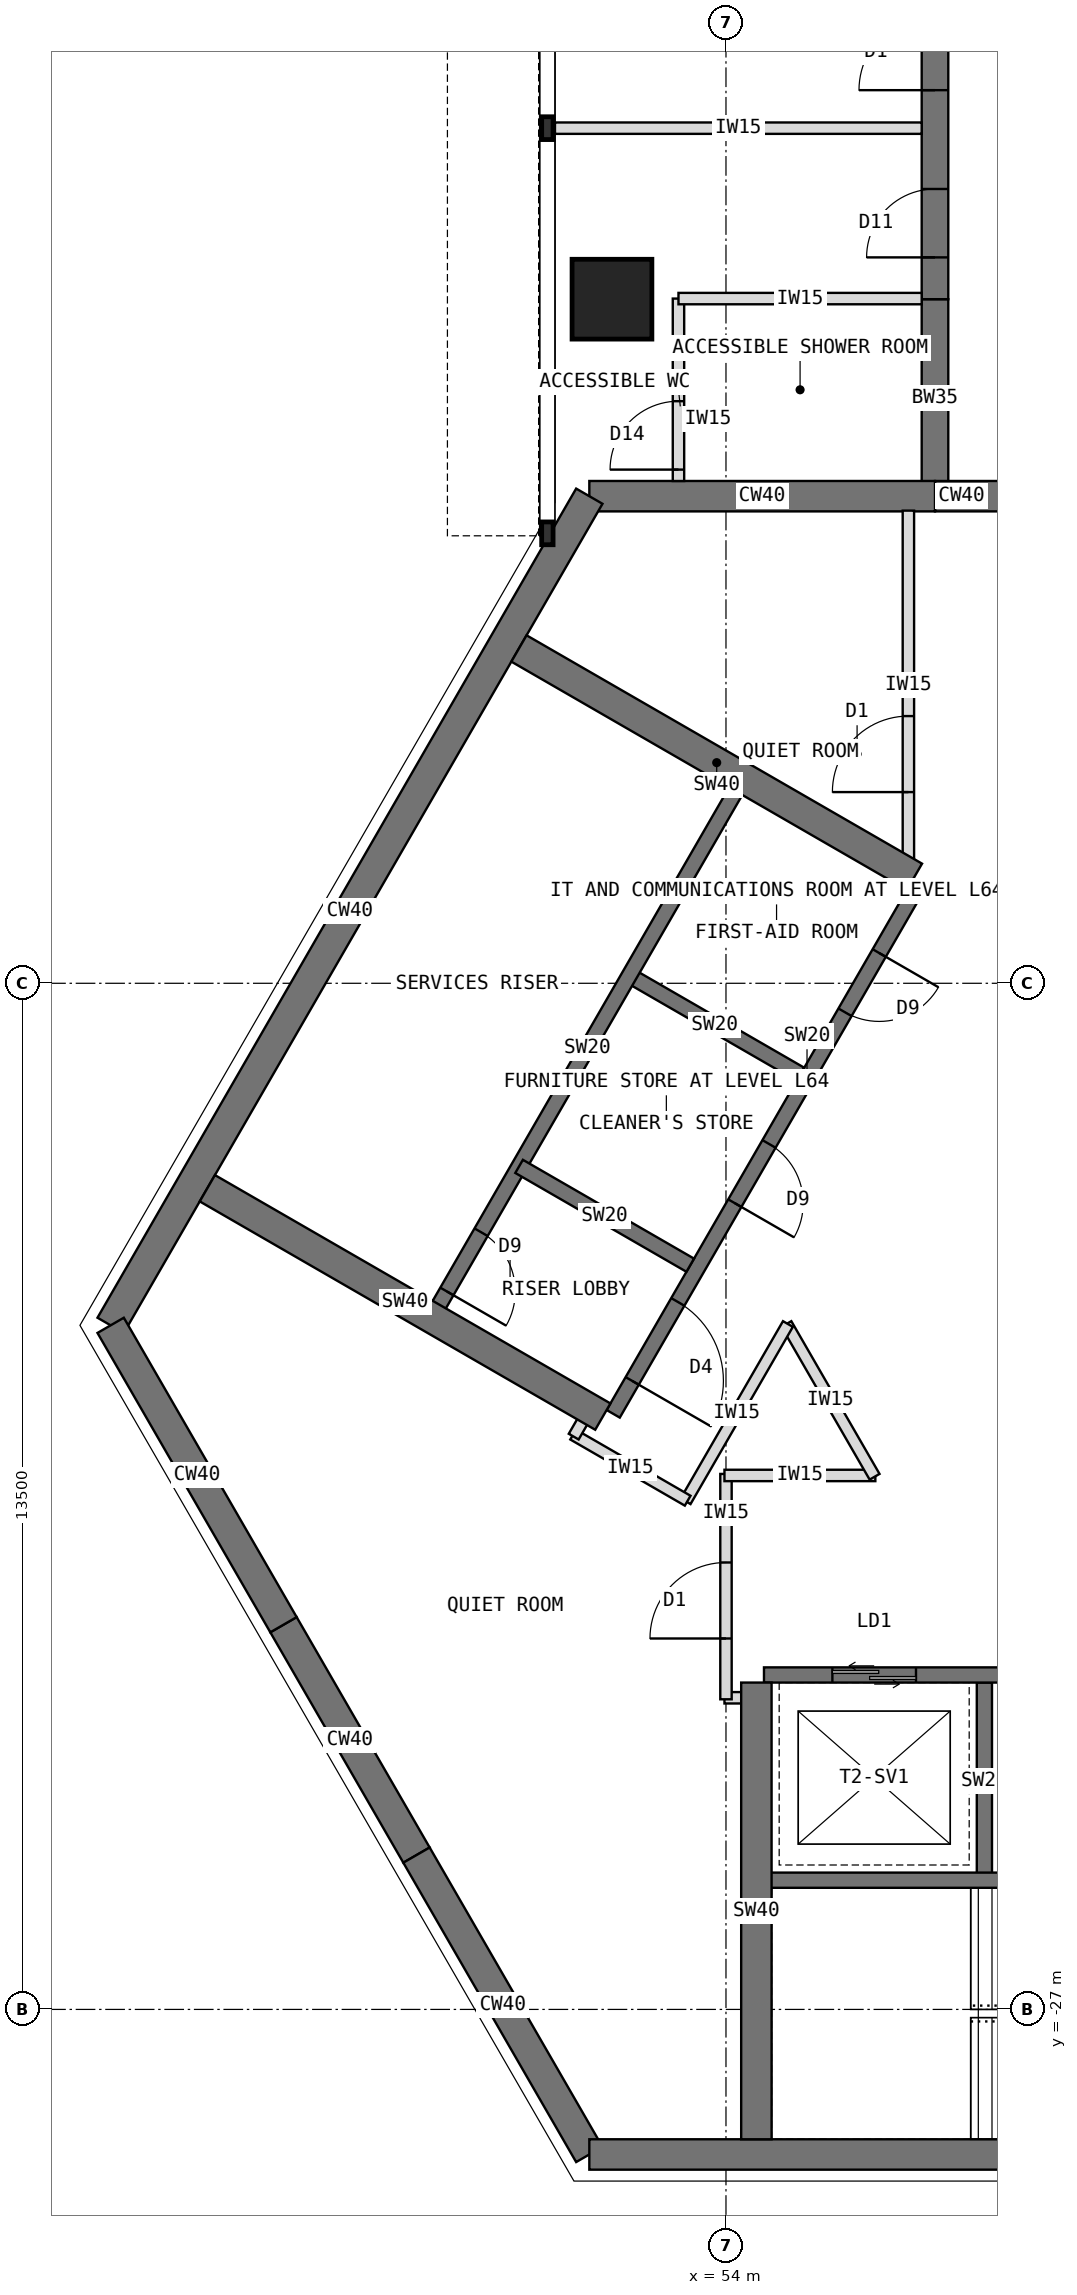
"""IFC4 building model, lengths in metres.
Left out: names, types, materials, properties, quantities, classifications, styles, units other than length and angle.
Written with IfcOpenShell. Run it as: python <this file> out.ifc"""

import sys

from ifc_helpers import new_model, si_unit, direction, frame, frame_2d, origin, origin_2d, place, context, subcontext, project, spatial, rectangle, extrude, element, fill, save


model = new_model("IFC4")
c1 = context("Model", 3, precision=1e-05, world=origin(), true_north=direction((0.0, 1.0)))
c2 = subcontext(c1, "Body", "Model", "MODEL_VIEW")
j1 = project(units=[si_unit("LENGTHUNIT", "METRE"), si_unit("PLANEANGLEUNIT", "RADIAN")], contexts=[c1])
p1 = place(None, origin())
s1 = spatial("IfcSite", under=j1, at=p1, CompositionType="ELEMENT")
p2 = place(p1, origin())
s2 = spatial("IfcBuilding", under=s1, at=p2, CompositionType="ELEMENT")
p3 = place(p2, frame((0.0, 0.0, 259.5)))
s3 = spatial("IfcBuildingStorey", under=s2, at=p3, CompositionType="ELEMENT", Elevation=259.5)
p4 = place(p3, frame((60.25, -7.092, 0.0), z_axis=(0.0, 0.0, 1.0), x_axis=(-1.0, 0.0, 0.0)))
e1 = element("IfcWall", 1, at=p4, inside=s3, PredefinedType="SHEAR", context=c2, shape_type="SweptSolid", body=[
    extrude(rectangle(XDim=3.5, YDim=0.4, at=frame_2d((1.75, 0.0))), origin(), (0.0, 0.0, 1.0), 4.0),
])
p5 = place(p4, frame((0.85, 0.0, 0.0)))
e2 = element("IfcOpeningElement", 2, at=p5, cuts=e1, PredefinedType="OPENING", context=c2, shape_type="SweptSolid", body=[
    extrude(rectangle(XDim=1.8, YDim=2.1, at=frame_2d((0.9, 1.05))), frame((0.0, 0.21, 0.0), z_axis=(0.0, -1.0, 0.0), x_axis=(1.0, 0.0, 0.0)), (0.0, 0.0, 1.0), 0.42),
])
p6 = place(p3, frame((56.75, -7.092, 0.0), z_axis=(0.0, 0.0, 1.0), x_axis=(-1.0, 0.0, 0.0)))
e3 = element("IfcWall", 3, at=p6, inside=s3, PredefinedType="SHEAR", context=c2, shape_type="SweptSolid", body=[
    extrude(rectangle(XDim=4.548, YDim=0.4, at=frame_2d((2.274, 0.0))), origin(), (0.0, 0.0, 1.0), 4.0),
])
p7 = place(p3, frame((52.202, -7.092, 0.0), z_axis=(0.0, 0.0, 1.0), x_axis=(-0.500005998175, -0.866021940709, 0.0)))
e4 = element("IfcWall", 4, at=p7, inside=s3, PredefinedType="SHEAR", context=c2, shape_type="SweptSolid", body=[
    extrude(rectangle(XDim=12.596, YDim=0.4, at=frame_2d((6.298, 0.0))), origin(), (0.0, 0.0, 1.0), 4.0),
])
p8 = place(p3, frame((45.904, -18.0, 0.0), z_axis=(0.0, 0.0, 1.0), x_axis=(0.500024481964, -0.866011268655, 0.0)))
e5 = element("IfcWall", 5, at=p8, inside=s3, PredefinedType="SHEAR", context=c2, shape_type="SweptSolid", body=[
    extrude(rectangle(XDim=4.548, YDim=0.4, at=frame_2d((2.274, 0.0))), origin(), (0.0, 0.0, 1.0), 4.0),
])
p9 = place(p3, frame((48.178, -21.939, 0.0), z_axis=(0.0, 0.0, 1.0), x_axis=(0.500010275428, -0.866019471182, 0.0)))
e6 = element("IfcWall", 6, at=p9, inside=s3, PredefinedType="SHEAR", context=c2, shape_type="SweptSolid", body=[
    extrude(rectangle(XDim=3.5, YDim=0.4, at=frame_2d((1.75, 0.0))), origin(), (0.0, 0.0, 1.0), 4.0),
])
p10 = place(p3, frame((49.928, -24.97, 0.0), z_axis=(0.0, 0.0, 1.0), x_axis=(0.499984222037, -0.866034513004, 0.0)))
e7 = element("IfcWall", 7, at=p10, inside=s3, PredefinedType="SHEAR", context=c2, shape_type="SweptSolid", body=[
    extrude(rectangle(XDim=4.548, YDim=0.4, at=frame_2d((2.274, 0.0))), origin(), (0.0, 0.0, 1.0), 4.0),
])
p11 = place(p3, frame((52.202, -28.908, 0.0), z_axis=(0.0, 0.0, 1.0), x_axis=(1.0, 0.0, 0.0)))
e8 = element("IfcWall", 8, at=p11, inside=s3, PredefinedType="SHEAR", context=c2, shape_type="SweptSolid", body=[
    extrude(rectangle(XDim=12.596, YDim=0.4, at=frame_2d((6.298, 0.0))), origin(), (0.0, 0.0, 1.0), 4.0),
])
p12 = place(p3, frame((56.75, -7.092, 0.0), z_axis=(0.0, 0.0, 1.0), x_axis=(0.0, 1.0, 0.0)))
e9 = element("IfcWall", 9, at=p12, inside=s3, PredefinedType="SHEAR", context=c2, shape_type="SweptSolid", body=[
    extrude(rectangle(XDim=2.592, YDim=0.35, at=frame_2d((1.296, 0.0))), origin(), (0.0, 0.0, 1.0), 4.0),
])
p13 = place(p3, frame((56.75, -4.5, 0.0), z_axis=(0.0, 0.0, 1.0), x_axis=(0.0, 1.0, 0.0)))
e10 = element("IfcWall", 10, at=p13, inside=s3, PredefinedType="SHEAR", context=c2, shape_type="SweptSolid", body=[
    extrude(rectangle(XDim=13.2, YDim=0.35, at=frame_2d((6.6, 0.0))), origin(), (0.0, 0.0, 1.0), 4.0),
])
p14 = place(p13, frame((0.55, 0.0, 0.0)))
e11 = element("IfcOpeningElement", 11, at=p14, cuts=e10, PredefinedType="OPENING", context=c2, shape_type="SweptSolid", body=[
    extrude(rectangle(XDim=0.9, YDim=2.1, at=frame_2d((0.45, 1.05))), frame((0.0, 0.185, 0.0), z_axis=(0.0, -1.0, 0.0), x_axis=(1.0, 0.0, 0.0)), (0.0, 0.0, 1.0), 0.37),
])
p15 = place(p13, frame((2.75, 0.0, 0.0)))
e12 = element("IfcOpeningElement", 12, at=p15, cuts=e10, PredefinedType="OPENING", context=c2, shape_type="SweptSolid", body=[
    extrude(rectangle(XDim=1.0, YDim=2.1, at=frame_2d((0.5, 1.05))), frame((0.0, 0.185, 0.0), z_axis=(0.0, -1.0, 0.0), x_axis=(1.0, 0.0, 0.0)), (0.0, 0.0, 1.0), 0.37),
])
p16 = place(p3, frame((52.5, -4.5, 0.0), z_axis=(0.0, 0.0, 1.0), x_axis=(1.0, 0.0, 0.0)))
e13 = element("IfcColumn", 13, at=p16, inside=s3, PredefinedType="COLUMN", context=c2, shape_type="SweptSolid", body=[
    extrude(rectangle(XDim=1.05, YDim=1.05, at=origin_2d()), origin(), (0.0, 0.0, 1.0), 4.0),
])
p17 = place(p3, frame((56.516, -12.236, 0.0), z_axis=(0.0, 0.0, 1.0), x_axis=(-0.49999894854, -0.866026010844, 0.0)))
e14 = element("IfcWall", 14, at=p17, inside=s3, PredefinedType="SHEAR", context=c2, shape_type="SweptSolid", body=[
    extrude(rectangle(XDim=8.0, YDim=0.2, at=frame_2d((4.0, 0.0))), origin(), (0.0, 0.0, 1.0), 4.0),
])
p18 = place(p17, frame((6.3, 0.0, 0.0)))
e15 = element("IfcOpeningElement", 15, at=p18, cuts=e14, PredefinedType="OPENING", context=c2, shape_type="SweptSolid", body=[
    extrude(rectangle(XDim=1.2, YDim=2.1, at=frame_2d((0.6, 1.05))), frame((0.0, 0.11, 0.0), z_axis=(0.0, -1.0, 0.0), x_axis=(1.0, 0.0, 0.0)), (0.0, 0.0, 1.0), 0.22),
])
p19 = place(p17, frame((1.0, 0.0, 0.0)))
e16 = element("IfcOpeningElement", 16, at=p19, cuts=e14, PredefinedType="OPENING", context=c2, shape_type="SweptSolid", body=[
    extrude(rectangle(XDim=0.9, YDim=2.1, at=frame_2d((0.45, 1.05))), frame((0.0, 0.11, 0.0), z_axis=(0.0, -1.0, 0.0), x_axis=(1.0, 0.0, 0.0)), (0.0, 0.0, 1.0), 0.22),
])
p20 = place(p17, frame((3.9, 0.0, 0.0)))
e17 = element("IfcOpeningElement", 17, at=p20, cuts=e14, PredefinedType="OPENING", context=c2, shape_type="SweptSolid", body=[
    extrude(rectangle(XDim=0.9, YDim=2.1, at=frame_2d((0.45, 1.05))), frame((0.0, 0.11, 0.0), z_axis=(0.0, -1.0, 0.0), x_axis=(1.0, 0.0, 0.0)), (0.0, 0.0, 1.0), 0.22),
])
for number, where, z_axis, x_axis in (
    (18, (54.98, -14.697, 0.0), (0.0, 0.0, 1.0), (-0.866, 0.5, 0.0)),
    (19, (53.53, -17.209, 0.0), (0.0, 0.0, 1.0), (-0.866, 0.5, 0.0)),
):
    element("IfcWall", number, at=place(p3, frame(where, z_axis=z_axis, x_axis=x_axis)), inside=s3, PredefinedType="SHEAR", context=c2, shape_type="SweptSolid", body=[
        extrude(rectangle(XDim=2.6, YDim=0.2, at=frame_2d((1.3, 0.0))), origin(), (0.0, 0.0, 1.0), 4.0),
    ])
p21 = place(p3, frame((54.178, -10.886, 0.0), z_axis=(0.0, 0.0, 1.0), x_axis=(-0.49999894854, -0.866026010844, 0.0)))
e20 = element("IfcWall", 20, at=p21, inside=s3, PredefinedType="SHEAR", context=c2, shape_type="SweptSolid", body=[
    extrude(rectangle(XDim=8.0, YDim=0.2, at=frame_2d((4.0, 0.0))), origin(), (0.0, 0.0, 1.0), 4.0),
])
p22 = place(p21, frame((6.8, 0.0, 0.0)))
e21 = element("IfcOpeningElement", 21, at=p22, cuts=e20, PredefinedType="OPENING", context=c2, shape_type="SweptSolid", body=[
    extrude(rectangle(XDim=0.9, YDim=2.1, at=frame_2d((0.45, 1.05))), frame((0.0, 0.11, 0.0), z_axis=(0.0, -1.0, 0.0), x_axis=(1.0, 0.0, 0.0)), (0.0, 0.0, 1.0), 0.22),
])
for number, where, z_axis, x_axis in (
    (22, (52.38, -19.201, 0.0), (0.0, 0.0, 1.0), (-0.866, 0.5, 0.0)),
    (23, (56.48, -12.099, 0.0), (0.0, 0.0, 1.0), (-0.866, 0.5, 0.0)),
):
    element("IfcWall", number, at=place(p3, frame(where, z_axis=z_axis, x_axis=x_axis)), inside=s3, PredefinedType="SHEAR", context=c2, shape_type="SweptSolid", body=[
        extrude(rectangle(XDim=6.008, YDim=0.4, at=frame_2d((3.004, 0.0))), origin(), (0.0, 0.0, 1.0), 4.0),
    ])
p23 = place(p3, frame((54.5, -22.6, 0.0), z_axis=(0.0, 0.0, 1.0), x_axis=(1.0, 0.0, 0.0)))
e24 = element("IfcWall", 24, at=p23, inside=s3, PredefinedType="SHEAR", context=c2, shape_type="SweptSolid", body=[
    extrude(rectangle(XDim=8.0, YDim=0.2, at=frame_2d((4.0, 0.0))), origin(), (0.0, 0.0, 1.0), 4.0),
])
p24 = place(p23, frame((6.3, 0.0, 0.0)))
e25 = element("IfcOpeningElement", 25, at=p24, cuts=e24, PredefinedType="OPENING", context=c2, shape_type="SweptSolid", body=[
    extrude(rectangle(XDim=1.2, YDim=2.1, at=frame_2d((0.6, 1.05))), frame((0.0, 0.11, 0.0), z_axis=(0.0, -1.0, 0.0), x_axis=(1.0, 0.0, 0.0)), (0.0, 0.0, 1.0), 0.22),
])
p25 = place(p23, frame((0.9, 0.0, 0.0)))
e26 = element("IfcOpeningElement", 26, at=p25, cuts=e24, PredefinedType="OPENING", context=c2, shape_type="SweptSolid", body=[
    extrude(rectangle(XDim=1.1, YDim=2.2, at=frame_2d((0.55, 1.1))), frame((0.0, 0.11, 0.0), z_axis=(0.0, -1.0, 0.0), x_axis=(1.0, 0.0, 0.0)), (0.0, 0.0, 1.0), 0.22),
])
p26 = place(p3, frame((57.4, -22.7, 0.0), z_axis=(0.0, 0.0, 1.0), x_axis=(0.0, -1.0, 0.0)))
e27 = element("IfcWall", 27, at=p26, inside=s3, PredefinedType="SHEAR", context=c2, shape_type="SweptSolid", body=[
    extrude(rectangle(XDim=2.6, YDim=0.2, at=frame_2d((1.3, 0.0))), origin(), (0.0, 0.0, 1.0), 4.0),
])
p27 = place(p3, frame((54.5, -25.3, 0.0), z_axis=(0.0, 0.0, 1.0), x_axis=(1.0, 0.0, 0.0)))
e28 = element("IfcWall", 28, at=p27, inside=s3, PredefinedType="SHEAR", context=c2, shape_type="SweptSolid", body=[
    extrude(rectangle(XDim=8.0, YDim=0.2, at=frame_2d((4.0, 0.0))), origin(), (0.0, 0.0, 1.0), 4.0),
])
p28 = place(p27, frame((6.7, 0.0, 0.0)))
e29 = element("IfcOpeningElement", 29, at=p28, cuts=e28, PredefinedType="OPENING", context=c2, shape_type="SweptSolid", body=[
    extrude(rectangle(XDim=1.1, YDim=2.1, at=frame_2d((0.55, 1.05))), frame((0.0, 0.11, 0.0), z_axis=(0.0, -1.0, 0.0), x_axis=(1.0, 0.0, 0.0)), (0.0, 0.0, 1.0), 0.22),
])
p29 = place(p3, frame((54.4, -22.7, 0.0), z_axis=(0.0, 0.0, 1.0), x_axis=(0.0, -1.0, 0.0)))
e30 = element("IfcWall", 30, at=p29, inside=s3, PredefinedType="SHEAR", context=c2, shape_type="SweptSolid", body=[
    extrude(rectangle(XDim=6.008, YDim=0.4, at=frame_2d((3.004, 0.0))), origin(), (0.0, 0.0, 1.0), 4.0),
])
p30 = place(p3, frame((56.575, -2.25, 0.0), z_axis=(0.0, 0.0, 1.0), x_axis=(-1.0, 0.0, 0.0)))
e31 = element("IfcWall", 31, at=p30, inside=s3, PredefinedType="PARTITIONING", context=c2, shape_type="SweptSolid", body=[
    extrude(rectangle(XDim=4.825, YDim=0.15, at=frame_2d((2.413, 0.0))), origin(), (0.0, 0.0, 1.0), 3.8),
])
p31 = place(p3, frame((53.375, -6.892, 0.0), z_axis=(0.0, 0.0, 1.0), x_axis=(0.0, 1.0, 0.0)))
e32 = element("IfcWall", 32, at=p31, inside=s3, PredefinedType="PARTITIONING", context=c2, shape_type="SweptSolid", body=[
    extrude(rectangle(XDim=2.4, YDim=0.15, at=frame_2d((1.2, 0.0))), origin(), (0.0, 0.0, 1.0), 3.8),
])
p32 = place(p31, frame((0.15, 0.0, 0.0)))
e33 = element("IfcOpeningElement", 33, at=p32, cuts=e32, PredefinedType="OPENING", context=c2, shape_type="SweptSolid", body=[
    extrude(rectangle(XDim=0.9, YDim=2.1, at=frame_2d((0.45, 1.05))), frame((0.0, 0.085, 0.0), z_axis=(0.0, -1.0, 0.0), x_axis=(1.0, 0.0, 0.0)), (0.0, 0.0, 1.0), 0.17),
])
p33 = place(p3, frame((56.575, -4.492, 0.0), z_axis=(0.0, 0.0, 1.0), x_axis=(-1.0, 0.0, 0.0)))
e34 = element("IfcWall", 34, at=p33, inside=s3, PredefinedType="PARTITIONING", context=c2, shape_type="SweptSolid", body=[
    extrude(rectangle(XDim=3.2, YDim=0.15, at=frame_2d((1.6, 0.0))), origin(), (0.0, 0.0, 1.0), 3.267),
])
p34 = place(p3, frame((54.41, -22.9, 0.0), z_axis=(0.0, 0.0, 1.0), x_axis=(-1.0, 0.0, 0.0)))
e35 = element("IfcWall", 35, at=p34, inside=s3, PredefinedType="PARTITIONING", context=c2, shape_type="SweptSolid", body=[
    extrude(rectangle(XDim=0.43, YDim=0.15, at=frame_2d((0.215, 0.0))), origin(), (0.0, 0.0, 1.0), 3.8),
])
p35 = place(p3, frame((54.0, -22.92, 0.0), z_axis=(0.0, 0.0, 1.0), x_axis=(0.0, 1.0, 0.0)))
e36 = element("IfcWall", 36, at=p35, inside=s3, PredefinedType="PARTITIONING", context=c2, shape_type="SweptSolid", body=[
    extrude(rectangle(XDim=2.965, YDim=0.15, at=frame_2d((1.482, 0.0))), origin(), (0.0, 0.0, 1.0), 3.8),
])
p36 = place(p35, frame((0.8, 0.0, 0.0)))
e37 = element("IfcOpeningElement", 37, at=p36, cuts=e36, PredefinedType="OPENING", context=c2, shape_type="SweptSolid", body=[
    extrude(rectangle(XDim=1.0, YDim=2.1, at=frame_2d((0.5, 1.05))), frame((0.0, 0.085, 0.0), z_axis=(0.0, -1.0, 0.0), x_axis=(1.0, 0.0, 0.0)), (0.0, 0.0, 1.0), 0.17),
])
p37 = place(p3, frame((53.98, -19.975, 0.0), z_axis=(0.0, 0.0, 1.0), x_axis=(1.0, 0.0, 0.0)))
e38 = element("IfcWall", 38, at=p37, inside=s3, PredefinedType="PARTITIONING", context=c2, shape_type="SweptSolid", body=[
    extrude(rectangle(XDim=1.985, YDim=0.15, at=frame_2d((0.993, 0.0))), origin(), (0.0, 0.0, 1.0), 3.8),
])
p38 = place(p3, frame((55.955, -19.992, 0.0), z_axis=(0.0, 0.0, 1.0), x_axis=(-0.499941024108, 0.866059450854, 0.0)))
e39 = element("IfcWall", 39, at=p38, inside=s3, PredefinedType="PARTITIONING", context=c2, shape_type="SweptSolid", body=[
    extrude(rectangle(XDim=2.321, YDim=0.15, at=frame_2d((1.16, 0.0))), origin(), (0.0, 0.0, 1.0), 3.8),
])
p39 = place(p3, frame((54.815, -17.983, 0.0), z_axis=(0.0, 0.0, 1.0), x_axis=(-0.499981473571, -0.866036099759, 0.0)))
e40 = element("IfcWall", 40, at=p39, inside=s3, PredefinedType="PARTITIONING", context=c2, shape_type="SweptSolid", body=[
    extrude(rectangle(XDim=2.692, YDim=0.15, at=frame_2d((1.346, 0.0))), origin(), (0.0, 0.0, 1.0), 3.8),
])
p40 = place(p3, frame((53.496, -20.307, 0.0), z_axis=(0.0, 0.0, 1.0), x_axis=(-0.865989304205, 0.500062521093, 0.0)))
e41 = element("IfcWall", 41, at=p40, inside=s3, PredefinedType="PARTITIONING", context=c2, shape_type="SweptSolid", body=[
    extrude(rectangle(XDim=1.74, YDim=0.15, at=frame_2d((0.87, 0.0))), origin(), (0.0, 0.0, 1.0), 3.8),
])
p41 = place(p3, frame((51.997, -19.464, 0.0), z_axis=(0.0, 0.0, 1.0), x_axis=(0.499804398801, 0.866138304741, 0.0)))
e42 = element("IfcWall", 42, at=p41, inside=s3, PredefinedType="PARTITIONING", context=c2, shape_type="SweptSolid", body=[
    extrude(rectangle(XDim=0.43, YDim=0.15, at=frame_2d((0.215, 0.0))), origin(), (0.0, 0.0, 1.0), 3.8),
])
p42 = place(p3, frame((56.4, -11.857, 0.0), z_axis=(0.0, 0.0, 1.0), x_axis=(0.0, 1.0, 0.0)))
e43 = element("IfcWall", 43, at=p42, inside=s3, PredefinedType="PARTITIONING", context=c2, shape_type="SweptSolid", body=[
    extrude(rectangle(XDim=4.576, YDim=0.15, at=frame_2d((2.288, 0.0))), origin(), (0.0, 0.0, 1.0), 3.8),
])
p43 = place(p42, frame((0.873, 0.0, 0.0)))
e44 = element("IfcOpeningElement", 44, at=p43, cuts=e43, PredefinedType="OPENING", context=c2, shape_type="SweptSolid", body=[
    extrude(rectangle(XDim=1.0, YDim=2.1, at=frame_2d((0.5, 1.05))), frame((0.0, 0.085, 0.0), z_axis=(0.0, -1.0, 0.0), x_axis=(1.0, 0.0, 0.0)), (0.0, 0.0, 1.0), 0.17),
])
p44 = place(p18, origin())
e45 = element("IfcDoor", 45, at=p44, inside=s3, OperationType="SINGLE_SWING_RIGHT", PredefinedType="DOOR", context=c2, shape_type="SweptSolid", body=[
    extrude(rectangle(XDim=1.2, YDim=2.1, at=frame_2d((0.6, 1.05))), frame((0.0, 0.025, 0.0), z_axis=(0.0, -1.0, 0.0), x_axis=(1.0, 0.0, 0.0)), (0.0, 0.0, 1.0), 0.05),
])
fill(e15, e45)
p45 = place(p22, origin())
e46 = element("IfcDoor", 46, at=p45, inside=s3, OperationType="SINGLE_SWING_RIGHT", PredefinedType="DOOR", context=c2, shape_type="SweptSolid", body=[
    extrude(rectangle(XDim=0.9, YDim=2.1, at=frame_2d((0.45, 1.05))), frame((0.0, 0.025, 0.0), z_axis=(0.0, -1.0, 0.0), x_axis=(1.0, 0.0, 0.0)), (0.0, 0.0, 1.0), 0.05),
])
fill(e21, e46)
p46 = place(p25, origin())
e47 = element("IfcDoor", 47, at=p46, inside=s3, OperationType="DOUBLE_DOOR_SLIDING", PredefinedType="DOOR", context=c2, shape_type="SweptSolid", body=[
    extrude(rectangle(XDim=1.1, YDim=2.2, at=frame_2d((0.55, 1.1))), frame((0.0, 0.025, 0.0), z_axis=(0.0, -1.0, 0.0), x_axis=(1.0, 0.0, 0.0)), (0.0, 0.0, 1.0), 0.05),
])
fill(e26, e47)
p47 = place(p32, origin())
e48 = element("IfcDoor", 48, at=p47, inside=s3, OperationType="SINGLE_SWING_LEFT", PredefinedType="DOOR", context=c2, shape_type="SweptSolid", body=[
    extrude(rectangle(XDim=0.9, YDim=2.1, at=frame_2d((0.45, 1.05))), frame((0.0, 0.025, 0.0), z_axis=(0.0, -1.0, 0.0), x_axis=(1.0, 0.0, 0.0)), (0.0, 0.0, 1.0), 0.05),
])
fill(e33, e48)
p48 = place(p36, origin())
e49 = element("IfcDoor", 49, at=p48, inside=s3, OperationType="SINGLE_SWING_LEFT", PredefinedType="DOOR", context=c2, shape_type="SweptSolid", body=[
    extrude(rectangle(XDim=1.0, YDim=2.1, at=frame_2d((0.5, 1.05))), frame((0.0, 0.025, 0.0), z_axis=(0.0, -1.0, 0.0), x_axis=(1.0, 0.0, 0.0)), (0.0, 0.0, 1.0), 0.05),
])
fill(e37, e49)
p49 = place(p43, origin())
e50 = element("IfcDoor", 50, at=p49, inside=s3, OperationType="SINGLE_SWING_LEFT", PredefinedType="DOOR", context=c2, shape_type="SweptSolid", body=[
    extrude(rectangle(XDim=1.0, YDim=2.1, at=frame_2d((0.5, 1.05))), frame((0.0, 0.025, 0.0), z_axis=(0.0, -1.0, 0.0), x_axis=(1.0, 0.0, 0.0)), (0.0, 0.0, 1.0), 0.05),
])
fill(e44, e50)
p50 = place(p14, origin())
e51 = element("IfcDoor", 51, at=p50, inside=s3, OperationType="SINGLE_SWING_LEFT", PredefinedType="DOOR", context=c2, shape_type="SweptSolid", body=[
    extrude(rectangle(XDim=0.9, YDim=2.1, at=frame_2d((0.45, 1.05))), frame((0.0, 0.025, 0.0), z_axis=(0.0, -1.0, 0.0), x_axis=(1.0, 0.0, 0.0)), (0.0, 0.0, 1.0), 0.05),
])
fill(e11, e51)
p51 = place(p15, origin())
e52 = element("IfcDoor", 52, at=p51, inside=s3, OperationType="SINGLE_SWING_LEFT", PredefinedType="DOOR", context=c2, shape_type="SweptSolid", body=[
    extrude(rectangle(XDim=1.0, YDim=2.1, at=frame_2d((0.5, 1.05))), frame((0.0, 0.025, 0.0), z_axis=(0.0, -1.0, 0.0), x_axis=(1.0, 0.0, 0.0)), (0.0, 0.0, 1.0), 0.05),
])
fill(e12, e52)
p52 = place(p19, origin())
e53 = element("IfcDoor", 53, at=p52, inside=s3, OperationType="SINGLE_SWING_LEFT", PredefinedType="DOOR", context=c2, shape_type="SweptSolid", body=[
    extrude(rectangle(XDim=0.9, YDim=2.1, at=frame_2d((0.45, 1.05))), frame((0.0, 0.025, 0.0), z_axis=(0.0, -1.0, 0.0), x_axis=(1.0, 0.0, 0.0)), (0.0, 0.0, 1.0), 0.05),
])
fill(e16, e53)
p53 = place(p20, origin())
e54 = element("IfcDoor", 54, at=p53, inside=s3, OperationType="SINGLE_SWING_RIGHT", PredefinedType="DOOR", context=c2, shape_type="SweptSolid", body=[
    extrude(rectangle(XDim=0.9, YDim=2.1, at=frame_2d((0.45, 1.05))), frame((0.0, 0.025, 0.0), z_axis=(0.0, -1.0, 0.0), x_axis=(1.0, 0.0, 0.0)), (0.0, 0.0, 1.0), 0.05),
])
fill(e17, e54)
save(model, sys.argv[1])
